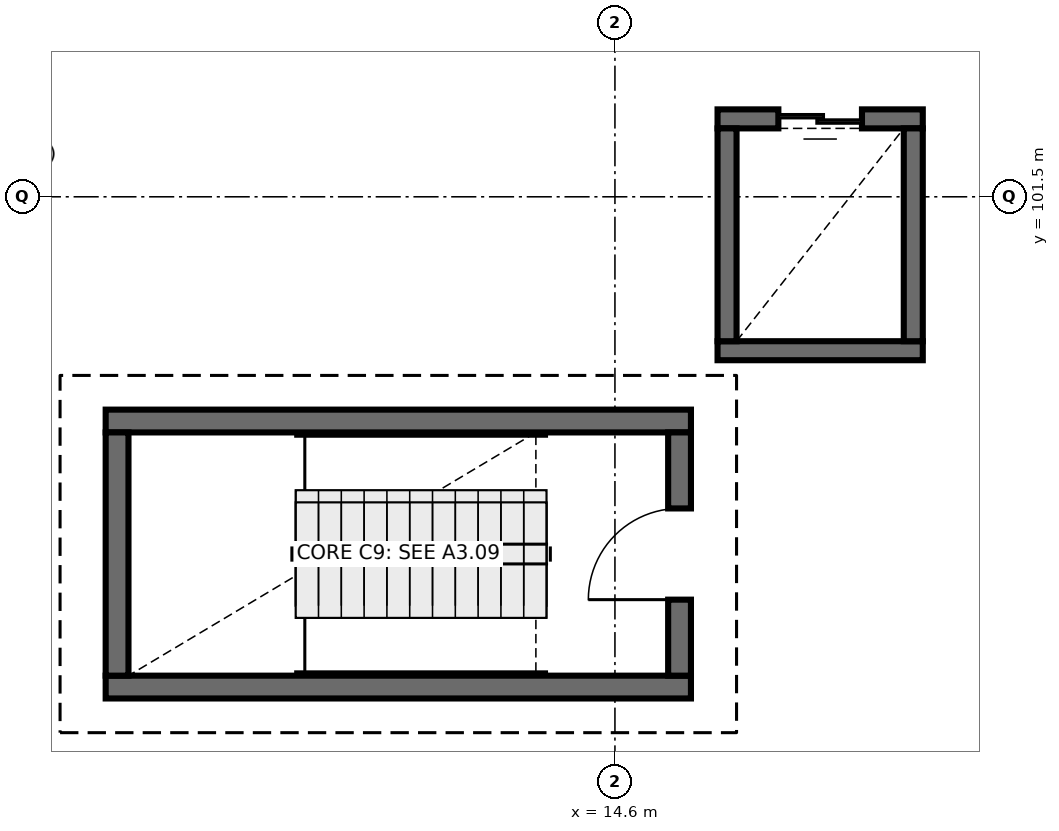
"""IFC4 building model, lengths in metres.
Left out: names, types, materials, properties, quantities, classifications, styles, units other than length and angle.
Written with IfcOpenShell. Run it as: python <this file> out.ifc"""

import sys

from ifc_helpers import new_model, si_unit, direction, frame, frame_2d, origin, place, context, subcontext, project, spatial, rectangle, extrude, element, fill, save


model = new_model("IFC4")
c1 = context("Model", 3, precision=1e-05, world=origin(), true_north=direction((0.0, 1.0)))
c2 = subcontext(c1, "Body", "Model", "MODEL_VIEW")
j1 = project(units=[si_unit("LENGTHUNIT", "METRE"), si_unit("PLANEANGLEUNIT", "RADIAN")], contexts=[c1])
p1 = place(None, origin())
s1 = spatial("IfcSite", under=j1, at=p1, CompositionType="ELEMENT")
p2 = place(p1, origin())
s2 = spatial("IfcBuilding", under=s1, at=p2, CompositionType="ELEMENT")
p3 = place(p2, frame((0.0, 0.0, 13.8)))
s3 = spatial("IfcBuildingStorey", under=s2, at=p3, CompositionType="ELEMENT", Elevation=13.8)
for number, where, z_axis, x_axis in (
    (1, (7.9, 95.05, 0.0), (0.0, 0.0, 1.0), (1.0, 0.0, 0.0)),
    (2, (15.6, 98.55, 0.0), (0.0, 0.0, 1.0), (-1.0, 0.0, 0.0)),
):
    element("IfcWall", number, at=place(p3, frame(where, z_axis=z_axis, x_axis=x_axis)), inside=s3, PredefinedType="SHEAR", context=c2, shape_type="SweptSolid", body=[
        extrude(rectangle(XDim=7.7, YDim=0.3, at=frame_2d((3.85, 0.0))), origin(), (0.0, 0.0, 1.0), 4.5),
    ])
p4 = place(p3, frame((8.05, 98.4, 0.0), z_axis=(0.0, 0.0, 1.0), x_axis=(0.0, -1.0, 0.0)))
e3 = element("IfcWall", 3, at=p4, inside=s3, PredefinedType="SHEAR", context=c2, shape_type="SweptSolid", body=[
    extrude(rectangle(XDim=3.2, YDim=0.3, at=frame_2d((1.6, 0.0))), origin(), (0.0, 0.0, 1.0), 4.5),
])
p5 = place(p3, frame((15.45, 95.2, 0.0), z_axis=(0.0, 0.0, 1.0), x_axis=(0.0, 1.0, 0.0)))
e4 = element("IfcWall", 4, at=p5, inside=s3, PredefinedType="SHEAR", context=c2, shape_type="SweptSolid", body=[
    extrude(rectangle(XDim=3.2, YDim=0.3, at=frame_2d((1.6, 0.0))), origin(), (0.0, 0.0, 1.0), 4.5),
])
p6 = place(p5, frame((1.0, 0.0, 0.0)))
e5 = element("IfcOpeningElement", 5, at=p6, cuts=e4, PredefinedType="OPENING", context=c2, shape_type="SweptSolid", body=[
    extrude(rectangle(XDim=1.2, YDim=2.15, at=frame_2d((0.6, 1.075))), frame((0.0, 0.16, 0.0), z_axis=(0.0, -1.0, 0.0), x_axis=(1.0, 0.0, 0.0)), (0.0, 0.0, 1.0), 0.32),
])
p7 = place(p3, frame((15.95, 99.475, 0.0), z_axis=(0.0, 0.0, 1.0), x_axis=(1.0, 0.0, 0.0)))
e6 = element("IfcWall", 6, at=p7, inside=s3, PredefinedType="SHEAR", context=c2, shape_type="SweptSolid", body=[
    extrude(rectangle(XDim=2.7, YDim=0.25, at=frame_2d((1.35, 0.0))), origin(), (0.0, 0.0, 1.0), 4.5),
])
p8 = place(p3, frame((18.65, 102.525, 0.0), z_axis=(0.0, 0.0, 1.0), x_axis=(-1.0, 0.0, 0.0)))
e7 = element("IfcWall", 7, at=p8, inside=s3, PredefinedType="SHEAR", context=c2, shape_type="SweptSolid", body=[
    extrude(rectangle(XDim=2.7, YDim=0.25, at=frame_2d((1.35, 0.0))), origin(), (0.0, 0.0, 1.0), 4.5),
])
p9 = place(p8, frame((0.8, 0.0, 0.0)))
e8 = element("IfcOpeningElement", 8, at=p9, cuts=e7, PredefinedType="OPENING", context=c2, shape_type="SweptSolid", body=[
    extrude(rectangle(XDim=1.1, YDim=2.15, at=frame_2d((0.55, 1.075))), frame((0.0, 0.135, 0.0), z_axis=(0.0, -1.0, 0.0), x_axis=(1.0, 0.0, 0.0)), (0.0, 0.0, 1.0), 0.27),
])
for number, where, z_axis, x_axis in (
    (9, (16.075, 102.4, 0.0), (0.0, 0.0, 1.0), (0.0, -1.0, 0.0)),
    (10, (18.525, 99.6, 0.0), (0.0, 0.0, 1.0), (0.0, 1.0, 0.0)),
):
    element("IfcWall", number, at=place(p3, frame(where, z_axis=z_axis, x_axis=x_axis)), inside=s3, PredefinedType="SHEAR", context=c2, shape_type="SweptSolid", body=[
        extrude(rectangle(XDim=2.8, YDim=0.25, at=frame_2d((1.4, 0.0))), origin(), (0.0, 0.0, 1.0), 4.5),
    ])
p10 = place(p6, origin())
e11 = element("IfcDoor", 11, at=p10, inside=s3, OperationType="SINGLE_SWING_LEFT", PredefinedType="DOOR", context=c2, shape_type="SweptSolid", body=[
    extrude(rectangle(XDim=1.2, YDim=2.15, at=frame_2d((0.6, 1.075))), frame((0.0, 0.025, 0.0), z_axis=(0.0, -1.0, 0.0), x_axis=(1.0, 0.0, 0.0)), (0.0, 0.0, 1.0), 0.05),
])
fill(e5, e11)
p11 = place(p9, origin())
e12 = element("IfcDoor", 12, at=p11, inside=s3, OperationType="DOUBLE_DOOR_SLIDING", PredefinedType="DOOR", context=c2, shape_type="SweptSolid", body=[
    extrude(rectangle(XDim=1.1, YDim=2.15, at=frame_2d((0.55, 1.075))), frame((0.0, 0.025, 0.0), z_axis=(0.0, -1.0, 0.0), x_axis=(1.0, 0.0, 0.0)), (0.0, 0.0, 1.0), 0.05),
])
fill(e8, e12)
save(model, sys.argv[1])
